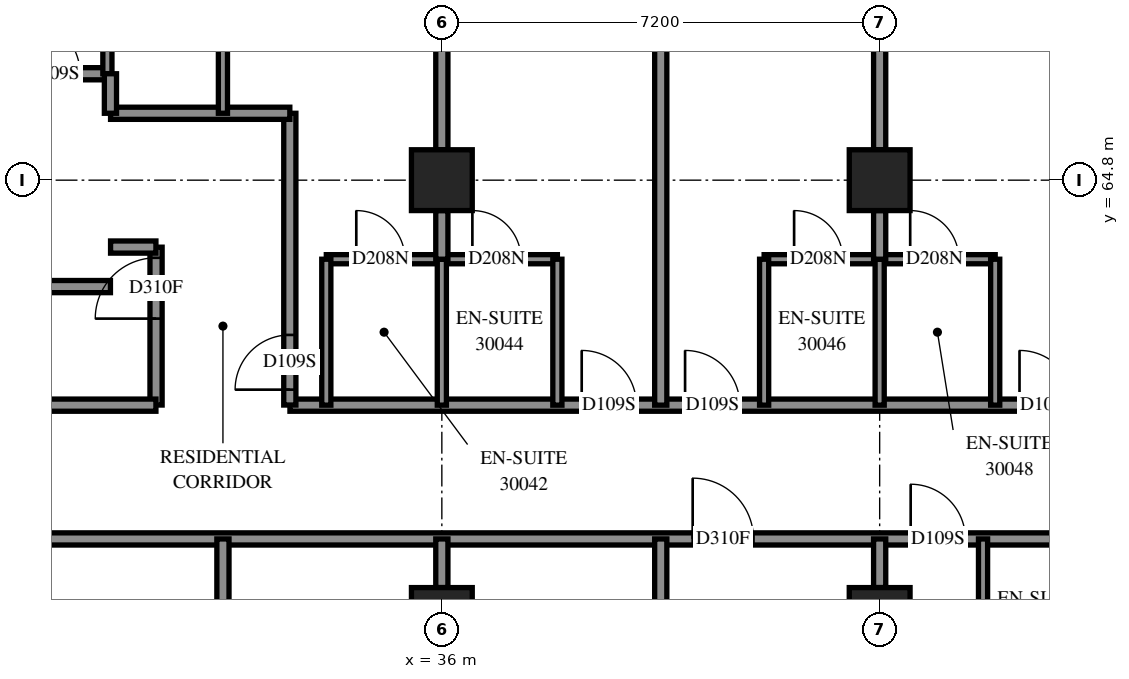
"""IFC4 building model, lengths in metres.
Left out: names, types, materials, properties, quantities, classifications, styles, units other than length and angle.
Written with IfcOpenShell. Run it as: python <this file> out.ifc"""

import sys

from ifc_helpers import new_model, si_unit, direction, frame, frame_2d, origin, origin_2d, place, context, subcontext, project, spatial, rectangle, extrude, element, fill, save


model = new_model("IFC4")
c1 = context("Model", 3, precision=1e-05, world=origin(), true_north=direction((0.0, 1.0)))
c2 = subcontext(c1, "Body", "Model", "MODEL_VIEW")
j1 = project(units=[si_unit("LENGTHUNIT", "METRE"), si_unit("PLANEANGLEUNIT", "RADIAN")], contexts=[c1])
p1 = place(None, origin())
s1 = spatial("IfcSite", under=j1, at=p1, CompositionType="ELEMENT")
p2 = place(p1, origin())
s2 = spatial("IfcBuilding", under=s1, at=p2, CompositionType="ELEMENT")
p3 = place(p2, frame((0.0, 0.0, 111.8)))
s3 = spatial("IfcBuildingStorey", under=s2, at=p3, CompositionType="ELEMENT", Elevation=111.8)
for number, where, z_axis, x_axis in (
    (1, (36.0, 57.6, 0.0), (0.0, 0.0, 1.0), (1.0, 0.0, 0.0)),
    (2, (36.0, 64.8, 0.0), (0.0, 0.0, 1.0), (1.0, 0.0, 0.0)),
    (3, (43.2, 57.6, 0.0), (0.0, 0.0, 1.0), (1.0, 0.0, 0.0)),
    (4, (43.2, 64.8, 0.0), (0.0, 0.0, 1.0), (1.0, 0.0, 0.0)),
):
    element("IfcColumn", number, at=place(p3, frame(where, z_axis=z_axis, x_axis=x_axis)), inside=s3, PredefinedType="COLUMN", context=c2, shape_type="SweptSolid", body=[
        extrude(rectangle(XDim=1.0, YDim=1.0, at=origin_2d()), origin(), (0.0, 0.0, 1.0), 3.1),
    ])
p4 = place(p3, frame((28.802, 58.9, 0.0), z_axis=(0.0, 0.0, 1.0), x_axis=(1.0, 0.0, 0.0)))
e5 = element("IfcWall", 5, at=p4, inside=s3, PredefinedType="PARTITIONING", context=c2, shape_type="SweptSolid", body=[
    extrude(rectangle(XDim=24.098, YDim=0.2, at=frame_2d((12.049, 0.0))), origin(), (0.0, 0.0, 1.0), 3.1),
])
p5 = place(p4, frame((11.323, 0.0, 0.0)))
e6 = element("IfcOpeningElement", 6, at=p5, cuts=e5, PredefinedType="OPENING", context=c2, shape_type="SweptSolid", body=[
    extrude(rectangle(XDim=1.0, YDim=2.1, at=frame_2d((0.5, 1.05))), frame((0.0, 0.11, 0.0), z_axis=(0.0, -1.0, 0.0), x_axis=(1.0, 0.0, 0.0)), (0.0, 0.0, 1.0), 0.22),
])
p6 = place(p4, frame((14.908, 0.0, 0.0)))
e7 = element("IfcOpeningElement", 7, at=p6, cuts=e5, PredefinedType="OPENING", context=c2, shape_type="SweptSolid", body=[
    extrude(rectangle(XDim=0.9, YDim=2.1, at=frame_2d((0.45, 1.05))), frame((0.0, 0.11, 0.0), z_axis=(0.0, -1.0, 0.0), x_axis=(1.0, 0.0, 0.0)), (0.0, 0.0, 1.0), 0.22),
])
p7 = place(p4, frame((18.523, 0.0, 0.0)))
e8 = element("IfcOpeningElement", 8, at=p7, cuts=e5, PredefinedType="OPENING", context=c2, shape_type="SweptSolid", body=[
    extrude(rectangle(XDim=1.0, YDim=2.1, at=frame_2d((0.5, 1.05))), frame((0.0, 0.11, 0.0), z_axis=(0.0, -1.0, 0.0), x_axis=(1.0, 0.0, 0.0)), (0.0, 0.0, 1.0), 0.22),
])
p8 = place(p4, frame((22.845, 0.0, 0.0)))
e9 = element("IfcOpeningElement", 9, at=p8, cuts=e5, PredefinedType="OPENING", context=c2, shape_type="SweptSolid", body=[
    extrude(rectangle(XDim=1.0, YDim=2.1, at=frame_2d((0.5, 1.05))), frame((0.0, 0.11, 0.0), z_axis=(0.0, -1.0, 0.0), x_axis=(1.0, 0.0, 0.0)), (0.0, 0.0, 1.0), 0.22),
])
p9 = place(p3, frame((33.502, 61.1, 0.0), z_axis=(0.0, 0.0, 1.0), x_axis=(1.0, 0.0, 0.0)))
e10 = element("IfcWall", 10, at=p9, inside=s3, PredefinedType="PARTITIONING", context=c2, shape_type="SweptSolid", body=[
    extrude(rectangle(XDim=21.198, YDim=0.2, at=frame_2d((10.599, 0.0))), origin(), (0.0, 0.0, 1.0), 3.1),
])
p10 = place(p9, frame((4.798, 0.0, 0.0)))
e11 = element("IfcOpeningElement", 11, at=p10, cuts=e10, PredefinedType="OPENING", context=c2, shape_type="SweptSolid", body=[
    extrude(rectangle(XDim=0.9, YDim=2.1, at=frame_2d((0.45, 1.05))), frame((0.0, 0.11, 0.0), z_axis=(0.0, -1.0, 0.0), x_axis=(1.0, 0.0, 0.0)), (0.0, 0.0, 1.0), 0.22),
])
p11 = place(p9, frame((6.498, 0.0, 0.0)))
e12 = element("IfcOpeningElement", 12, at=p11, cuts=e10, PredefinedType="OPENING", context=c2, shape_type="SweptSolid", body=[
    extrude(rectangle(XDim=0.9, YDim=2.1, at=frame_2d((0.45, 1.05))), frame((0.0, 0.11, 0.0), z_axis=(0.0, -1.0, 0.0), x_axis=(1.0, 0.0, 0.0)), (0.0, 0.0, 1.0), 0.22),
])
p12 = place(p9, frame((11.998, 0.0, 0.0)))
e13 = element("IfcOpeningElement", 13, at=p12, cuts=e10, PredefinedType="OPENING", context=c2, shape_type="SweptSolid", body=[
    extrude(rectangle(XDim=0.9, YDim=2.1, at=frame_2d((0.45, 1.05))), frame((0.0, 0.11, 0.0), z_axis=(0.0, -1.0, 0.0), x_axis=(1.0, 0.0, 0.0)), (0.0, 0.0, 1.0), 0.22),
])
p13 = place(p9, frame((13.698, 0.0, 0.0)))
e14 = element("IfcOpeningElement", 14, at=p13, cuts=e10, PredefinedType="OPENING", context=c2, shape_type="SweptSolid", body=[
    extrude(rectangle(XDim=0.9, YDim=2.1, at=frame_2d((0.45, 1.05))), frame((0.0, 0.11, 0.0), z_axis=(0.0, -1.0, 0.0), x_axis=(1.0, 0.0, 0.0)), (0.0, 0.0, 1.0), 0.22),
])
p14 = place(p9, frame((19.198, 0.0, 0.0)))
e15 = element("IfcOpeningElement", 15, at=p14, cuts=e10, PredefinedType="OPENING", context=c2, shape_type="SweptSolid", body=[
    extrude(rectangle(XDim=0.9, YDim=2.1, at=frame_2d((0.45, 1.05))), frame((0.0, 0.11, 0.0), z_axis=(0.0, -1.0, 0.0), x_axis=(1.0, 0.0, 0.0)), (0.0, 0.0, 1.0), 0.22),
])
p15 = place(p3, frame((39.6, 61.1, 0.0), z_axis=(0.0, 0.0, 1.0), x_axis=(0.0, 1.0, 0.0)))
e16 = element("IfcWall", 16, at=p15, inside=s3, PredefinedType="PARTITIONING", context=c2, shape_type="SweptSolid", body=[
    extrude(rectangle(XDim=11.743, YDim=0.2, at=frame_2d((5.871, 0.0))), origin(), (0.0, 0.0, 1.0), 3.1),
])
for number, where, z_axis, x_axis in (
    (17, (36.0, 65.3, 0.0), (0.0, 0.0, 1.0), (0.0, 1.0, 0.0)),
    (18, (43.2, 65.3, 0.0), (0.0, 0.0, 1.0), (0.0, 1.0, 0.0)),
):
    element("IfcWall", number, at=place(p3, frame(where, z_axis=z_axis, x_axis=x_axis)), inside=s3, PredefinedType="PARTITIONING", context=c2, shape_type="SweptSolid", body=[
        extrude(rectangle(XDim=6.2, YDim=0.2, at=frame_2d((3.1, 0.0))), origin(), (0.0, 0.0, 1.0), 3.1),
    ])
p16 = place(p3, frame((33.5, 61.102, 0.0), z_axis=(0.0, 0.0, 1.0), x_axis=(0.0, 1.0, 0.0)))
e19 = element("IfcWall", 19, at=p16, inside=s3, PredefinedType="PARTITIONING", context=c2, shape_type="SweptSolid", body=[
    extrude(rectangle(XDim=4.798, YDim=0.2, at=frame_2d((2.399, 0.0))), origin(), (0.0, 0.0, 1.0), 3.1),
])
p17 = place(p16, frame((0.253, 0.0, 0.0)))
e20 = element("IfcOpeningElement", 20, at=p17, cuts=e19, PredefinedType="OPENING", context=c2, shape_type="SweptSolid", body=[
    extrude(rectangle(XDim=0.9, YDim=2.1, at=frame_2d((0.45, 1.05))), frame((0.0, 0.11, 0.0), z_axis=(0.0, -1.0, 0.0), x_axis=(1.0, 0.0, 0.0)), (0.0, 0.0, 1.0), 0.22),
])
p18 = place(p3, frame((41.3, 63.5, 0.0), z_axis=(0.0, 0.0, 1.0), x_axis=(1.0, 0.0, 0.0)))
e21 = element("IfcWall", 21, at=p18, inside=s3, PredefinedType="PARTITIONING", context=c2, shape_type="SweptSolid", body=[
    extrude(rectangle(XDim=3.8, YDim=0.15, at=frame_2d((1.9, 0.0))), origin(), (0.0, 0.0, 1.0), 3.1),
])
p19 = place(p18, frame((0.493, 0.0, 0.0)))
e22 = element("IfcOpeningElement", 22, at=p19, cuts=e21, PredefinedType="OPENING", context=c2, shape_type="SweptSolid", body=[
    extrude(rectangle(XDim=0.8, YDim=2.1, at=frame_2d((0.4, 1.05))), frame((0.0, 0.085, 0.0), z_axis=(0.0, -1.0, 0.0), x_axis=(1.0, 0.0, 0.0)), (0.0, 0.0, 1.0), 0.17),
])
p20 = place(p18, frame((2.402, 0.0, 0.0)))
e23 = element("IfcOpeningElement", 23, at=p20, cuts=e21, PredefinedType="OPENING", context=c2, shape_type="SweptSolid", body=[
    extrude(rectangle(XDim=0.8, YDim=2.1, at=frame_2d((0.4, 1.05))), frame((0.0, 0.085, 0.0), z_axis=(0.0, -1.0, 0.0), x_axis=(1.0, 0.0, 0.0)), (0.0, 0.0, 1.0), 0.17),
])
p21 = place(p3, frame((34.1, 63.5, 0.0), z_axis=(0.0, 0.0, 1.0), x_axis=(1.0, 0.0, 0.0)))
e24 = element("IfcWall", 24, at=p21, inside=s3, PredefinedType="PARTITIONING", context=c2, shape_type="SweptSolid", body=[
    extrude(rectangle(XDim=3.8, YDim=0.15, at=frame_2d((1.9, 0.0))), origin(), (0.0, 0.0, 1.0), 3.1),
])
p22 = place(p21, frame((0.493, 0.0, 0.0)))
e25 = element("IfcOpeningElement", 25, at=p22, cuts=e24, PredefinedType="OPENING", context=c2, shape_type="SweptSolid", body=[
    extrude(rectangle(XDim=0.8, YDim=2.1, at=frame_2d((0.4, 1.05))), frame((0.0, 0.085, 0.0), z_axis=(0.0, -1.0, 0.0), x_axis=(1.0, 0.0, 0.0)), (0.0, 0.0, 1.0), 0.17),
])
p23 = place(p21, frame((2.402, 0.0, 0.0)))
e26 = element("IfcOpeningElement", 26, at=p23, cuts=e24, PredefinedType="OPENING", context=c2, shape_type="SweptSolid", body=[
    extrude(rectangle(XDim=0.8, YDim=2.1, at=frame_2d((0.4, 1.05))), frame((0.0, 0.085, 0.0), z_axis=(0.0, -1.0, 0.0), x_axis=(1.0, 0.0, 0.0)), (0.0, 0.0, 1.0), 0.17),
])
p24 = place(p3, frame((27.1, 66.55, 0.0), z_axis=(0.0, 0.0, 1.0), x_axis=(1.0, 0.0, 0.0)))
e27 = element("IfcWall", 27, at=p24, inside=s3, PredefinedType="PARTITIONING", context=c2, shape_type="SweptSolid", body=[
    extrude(rectangle(XDim=3.4, YDim=0.2, at=frame_2d((1.7, 0.0))), origin(), (0.0, 0.0, 1.0), 3.1),
])
p25 = place(p24, frame((0.4, 0.0, 0.0)))
e28 = element("IfcOpeningElement", 28, at=p25, cuts=e27, PredefinedType="OPENING", context=c2, shape_type="SweptSolid", body=[
    extrude(rectangle(XDim=0.9, YDim=2.1, at=frame_2d((0.45, 1.05))), frame((0.0, 0.11, 0.0), z_axis=(0.0, -1.0, 0.0), x_axis=(1.0, 0.0, 0.0)), (0.0, 0.0, 1.0), 0.22),
])
p26 = place(p24, frame((2.05, 0.0, 0.0)))
e29 = element("IfcOpeningElement", 29, at=p26, cuts=e27, PredefinedType="OPENING", context=c2, shape_type="SweptSolid", body=[
    extrude(rectangle(XDim=0.9, YDim=2.1, at=frame_2d((0.45, 1.05))), frame((0.0, 0.11, 0.0), z_axis=(0.0, -1.0, 0.0), x_axis=(1.0, 0.0, 0.0)), (0.0, 0.0, 1.0), 0.22),
])
for number, where, z_axis, x_axis in (
    (30, (32.4, 55.778, 0.0), (0.0, 0.0, 1.0), (0.0, 1.0, 0.0)),
    (31, (39.6, 55.778, 0.0), (0.0, 0.0, 1.0), (0.0, 1.0, 0.0)),
):
    element("IfcWall", number, at=place(p3, frame(where, z_axis=z_axis, x_axis=x_axis)), inside=s3, PredefinedType="PARTITIONING", context=c2, shape_type="SweptSolid", body=[
        extrude(rectangle(XDim=3.122, YDim=0.2, at=frame_2d((1.561, 0.0))), origin(), (0.0, 0.0, 1.0), 3.1),
    ])
p27 = place(p3, frame((30.552, 65.9, 0.0), z_axis=(0.0, 0.0, 1.0), x_axis=(1.0, 0.0, 0.0)))
e32 = element("IfcWall", 32, at=p27, inside=s3, PredefinedType="PARTITIONING", context=c2, shape_type="SweptSolid", body=[
    extrude(rectangle(XDim=2.948, YDim=0.2, at=frame_2d((1.474, 0.0))), origin(), (0.0, 0.0, 1.0), 3.1),
])
p28 = place(p3, frame((31.3, 61.102, 0.0), z_axis=(0.0, 0.0, 1.0), x_axis=(0.0, 1.0, 0.0)))
e33 = element("IfcWall", 33, at=p28, inside=s3, PredefinedType="PARTITIONING", context=c2, shape_type="SweptSolid", body=[
    extrude(rectangle(XDim=2.596, YDim=0.2, at=frame_2d((1.298, 0.0))), origin(), (0.0, 0.0, 1.0), 3.1),
])
p29 = place(p28, frame((1.421, 0.0, 0.0)))
e34 = element("IfcOpeningElement", 34, at=p29, cuts=e33, PredefinedType="OPENING", context=c2, shape_type="SweptSolid", body=[
    extrude(rectangle(XDim=1.0, YDim=2.1, at=frame_2d((0.5, 1.05))), frame((0.0, 0.11, 0.0), z_axis=(0.0, -1.0, 0.0), x_axis=(1.0, 0.0, 0.0)), (0.0, 0.0, 1.0), 0.22),
])
p30 = place(p3, frame((28.802, 61.1, 0.0), z_axis=(0.0, 0.0, 1.0), x_axis=(1.0, 0.0, 0.0)))
e35 = element("IfcWall", 35, at=p30, inside=s3, PredefinedType="PARTITIONING", context=c2, shape_type="SweptSolid", body=[
    extrude(rectangle(XDim=2.496, YDim=0.2, at=frame_2d((1.248, 0.0))), origin(), (0.0, 0.0, 1.0), 3.1),
])
for number, where, z_axis, x_axis in (
    (36, (34.1, 61.1, 0.0), (0.0, 0.0, 1.0), (0.0, 1.0, 0.0)),
    (37, (36.0, 61.1, 0.0), (0.0, 0.0, 1.0), (0.0, 1.0, 0.0)),
    (38, (37.9, 61.1, 0.0), (0.0, 0.0, 1.0), (0.0, 1.0, 0.0)),
    (39, (41.3, 61.1, 0.0), (0.0, 0.0, 1.0), (0.0, 1.0, 0.0)),
    (40, (43.2, 61.1, 0.0), (0.0, 0.0, 1.0), (0.0, 1.0, 0.0)),
    (41, (45.1, 61.1, 0.0), (0.0, 0.0, 1.0), (0.0, 1.0, 0.0)),
    (42, (44.9, 56.5, 0.0), (0.0, 0.0, 1.0), (0.0, 1.0, 0.0)),
    (43, (32.4, 65.9, 0.0), (0.0, 0.0, 1.0), (0.0, 1.0, 0.0)),
):
    element("IfcWall", number, at=place(p3, frame(where, z_axis=z_axis, x_axis=x_axis)), inside=s3, PredefinedType="PARTITIONING", context=c2, shape_type="SweptSolid", body=[
        extrude(rectangle(XDim=2.4, YDim=0.15, at=frame_2d((1.2, 0.0))), origin(), (0.0, 0.0, 1.0), 3.1),
    ])
p31 = place(p3, frame((28.15, 63.05, 0.0), z_axis=(0.0, 0.0, 1.0), x_axis=(1.0, 0.0, 0.0)))
e44 = element("IfcWall", 44, at=p31, inside=s3, PredefinedType="PARTITIONING", context=c2, shape_type="SweptSolid", body=[
    extrude(rectangle(XDim=2.4, YDim=0.2, at=frame_2d((1.2, 0.0))), origin(), (0.0, 0.0, 1.0), 3.1),
])
p32 = place(p3, frame((30.5, 66.55, 0.0), z_axis=(0.0, 0.0, 1.0), x_axis=(0.0, 1.0, 0.0)))
e45 = element("IfcWall", 45, at=p32, inside=s3, PredefinedType="PARTITIONING", context=c2, shape_type="SweptSolid", body=[
    extrude(rectangle(XDim=1.75, YDim=0.15, at=frame_2d((0.875, 0.0))), origin(), (0.0, 0.0, 1.0), 3.1),
])
for number, where, z_axis, x_axis in (
    (46, (36.0, 58.1, 0.0), (0.0, 0.0, 1.0), (0.0, 1.0, 0.0)),
    (47, (36.0, 63.5, 0.0), (0.0, 0.0, 1.0), (0.0, 1.0, 0.0)),
    (48, (43.2, 58.1, 0.0), (0.0, 0.0, 1.0), (0.0, 1.0, 0.0)),
    (49, (43.2, 63.5, 0.0), (0.0, 0.0, 1.0), (0.0, 1.0, 0.0)),
):
    element("IfcWall", number, at=place(p3, frame(where, z_axis=z_axis, x_axis=x_axis)), inside=s3, PredefinedType="PARTITIONING", context=c2, shape_type="SweptSolid", body=[
        extrude(rectangle(XDim=0.8, YDim=0.2, at=frame_2d((0.4, 0.0))), origin(), (0.0, 0.0, 1.0), 3.1),
    ])
p33 = place(p3, frame((30.552, 63.7, 0.0), z_axis=(0.0, 0.0, 1.0), x_axis=(1.0, 0.0, 0.0)))
e50 = element("IfcWall", 50, at=p33, inside=s3, PredefinedType="PARTITIONING", context=c2, shape_type="SweptSolid", body=[
    extrude(rectangle(XDim=0.746, YDim=0.2, at=frame_2d((0.373, 0.0))), origin(), (0.0, 0.0, 1.0), 3.1),
])
p34 = place(p3, frame((30.55, 65.9, 0.0), z_axis=(0.0, 0.0, 1.0), x_axis=(0.0, 1.0, 0.0)))
e51 = element("IfcWall", 51, at=p34, inside=s3, PredefinedType="PARTITIONING", context=c2, shape_type="SweptSolid", body=[
    extrude(rectangle(XDim=0.65, YDim=0.2, at=frame_2d((0.325, 0.0))), origin(), (0.0, 0.0, 1.0), 3.1),
])
p35 = place(p29, origin())
e52 = element("IfcDoor", 52, at=p35, inside=s3, OperationType="SINGLE_SWING_LEFT", PredefinedType="DOOR", context=c2, shape_type="SweptSolid", body=[
    extrude(rectangle(XDim=1.0, YDim=2.1, at=frame_2d((0.5, 1.05))), frame((0.0, 0.025, 0.0), z_axis=(0.0, -1.0, 0.0), x_axis=(1.0, 0.0, 0.0)), (0.0, 0.0, 1.0), 0.05),
])
fill(e34, e52)
p36 = place(p5, origin())
e53 = element("IfcDoor", 53, at=p36, inside=s3, OperationType="SINGLE_SWING_RIGHT", PredefinedType="DOOR", context=c2, shape_type="SweptSolid", body=[
    extrude(rectangle(XDim=1.0, YDim=2.1, at=frame_2d((0.5, 1.05))), frame((0.0, 0.025, 0.0), z_axis=(0.0, -1.0, 0.0), x_axis=(1.0, 0.0, 0.0)), (0.0, 0.0, 1.0), 0.05),
])
fill(e6, e53)
p37 = place(p6, origin())
e54 = element("IfcDoor", 54, at=p37, inside=s3, OperationType="SINGLE_SWING_LEFT", PredefinedType="DOOR", context=c2, shape_type="SweptSolid", body=[
    extrude(rectangle(XDim=0.9, YDim=2.1, at=frame_2d((0.45, 1.05))), frame((0.0, 0.025, 0.0), z_axis=(0.0, -1.0, 0.0), x_axis=(1.0, 0.0, 0.0)), (0.0, 0.0, 1.0), 0.05),
])
fill(e7, e54)
p38 = place(p26, origin())
e55 = element("IfcDoor", 55, at=p38, inside=s3, OperationType="SINGLE_SWING_RIGHT", PredefinedType="DOOR", context=c2, shape_type="SweptSolid", body=[
    extrude(rectangle(XDim=0.9, YDim=2.1, at=frame_2d((0.45, 1.05))), frame((0.0, 0.025, 0.0), z_axis=(0.0, -1.0, 0.0), x_axis=(1.0, 0.0, 0.0)), (0.0, 0.0, 1.0), 0.05),
])
fill(e29, e55)
p39 = place(p17, origin())
e56 = element("IfcDoor", 56, at=p39, inside=s3, OperationType="SINGLE_SWING_LEFT", PredefinedType="DOOR", context=c2, shape_type="SweptSolid", body=[
    extrude(rectangle(XDim=0.9, YDim=2.1, at=frame_2d((0.45, 1.05))), frame((0.0, 0.025, 0.0), z_axis=(0.0, -1.0, 0.0), x_axis=(1.0, 0.0, 0.0)), (0.0, 0.0, 1.0), 0.05),
])
fill(e20, e56)
p40 = place(p22, origin())
e57 = element("IfcDoor", 57, at=p40, inside=s3, OperationType="SINGLE_SWING_RIGHT", PredefinedType="DOOR", context=c2, shape_type="SweptSolid", body=[
    extrude(rectangle(XDim=0.8, YDim=2.1, at=frame_2d((0.4, 1.05))), frame((0.0, 0.025, 0.0), z_axis=(0.0, -1.0, 0.0), x_axis=(1.0, 0.0, 0.0)), (0.0, 0.0, 1.0), 0.05),
])
fill(e25, e57)
p41 = place(p10, origin())
e58 = element("IfcDoor", 58, at=p41, inside=s3, OperationType="SINGLE_SWING_RIGHT", PredefinedType="DOOR", context=c2, shape_type="SweptSolid", body=[
    extrude(rectangle(XDim=0.9, YDim=2.1, at=frame_2d((0.45, 1.05))), frame((0.0, 0.025, 0.0), z_axis=(0.0, -1.0, 0.0), x_axis=(1.0, 0.0, 0.0)), (0.0, 0.0, 1.0), 0.05),
])
fill(e11, e58)
p42 = place(p23, origin())
e59 = element("IfcDoor", 59, at=p42, inside=s3, OperationType="SINGLE_SWING_RIGHT", PredefinedType="DOOR", context=c2, shape_type="SweptSolid", body=[
    extrude(rectangle(XDim=0.8, YDim=2.1, at=frame_2d((0.4, 1.05))), frame((0.0, 0.025, 0.0), z_axis=(0.0, -1.0, 0.0), x_axis=(1.0, 0.0, 0.0)), (0.0, 0.0, 1.0), 0.05),
])
fill(e26, e59)
p43 = place(p11, origin())
e60 = element("IfcDoor", 60, at=p43, inside=s3, OperationType="SINGLE_SWING_LEFT", PredefinedType="DOOR", context=c2, shape_type="SweptSolid", body=[
    extrude(rectangle(XDim=0.9, YDim=2.1, at=frame_2d((0.45, 1.05))), frame((0.0, 0.025, 0.0), z_axis=(0.0, -1.0, 0.0), x_axis=(1.0, 0.0, 0.0)), (0.0, 0.0, 1.0), 0.05),
])
fill(e12, e60)
p44 = place(p19, origin())
e61 = element("IfcDoor", 61, at=p44, inside=s3, OperationType="SINGLE_SWING_RIGHT", PredefinedType="DOOR", context=c2, shape_type="SweptSolid", body=[
    extrude(rectangle(XDim=0.8, YDim=2.1, at=frame_2d((0.4, 1.05))), frame((0.0, 0.025, 0.0), z_axis=(0.0, -1.0, 0.0), x_axis=(1.0, 0.0, 0.0)), (0.0, 0.0, 1.0), 0.05),
])
fill(e22, e61)
p45 = place(p12, origin())
e62 = element("IfcDoor", 62, at=p45, inside=s3, OperationType="SINGLE_SWING_RIGHT", PredefinedType="DOOR", context=c2, shape_type="SweptSolid", body=[
    extrude(rectangle(XDim=0.9, YDim=2.1, at=frame_2d((0.45, 1.05))), frame((0.0, 0.025, 0.0), z_axis=(0.0, -1.0, 0.0), x_axis=(1.0, 0.0, 0.0)), (0.0, 0.0, 1.0), 0.05),
])
fill(e13, e62)
p46 = place(p20, origin())
e63 = element("IfcDoor", 63, at=p46, inside=s3, OperationType="SINGLE_SWING_RIGHT", PredefinedType="DOOR", context=c2, shape_type="SweptSolid", body=[
    extrude(rectangle(XDim=0.8, YDim=2.1, at=frame_2d((0.4, 1.05))), frame((0.0, 0.025, 0.0), z_axis=(0.0, -1.0, 0.0), x_axis=(1.0, 0.0, 0.0)), (0.0, 0.0, 1.0), 0.05),
])
fill(e23, e63)
save(model, sys.argv[1])
